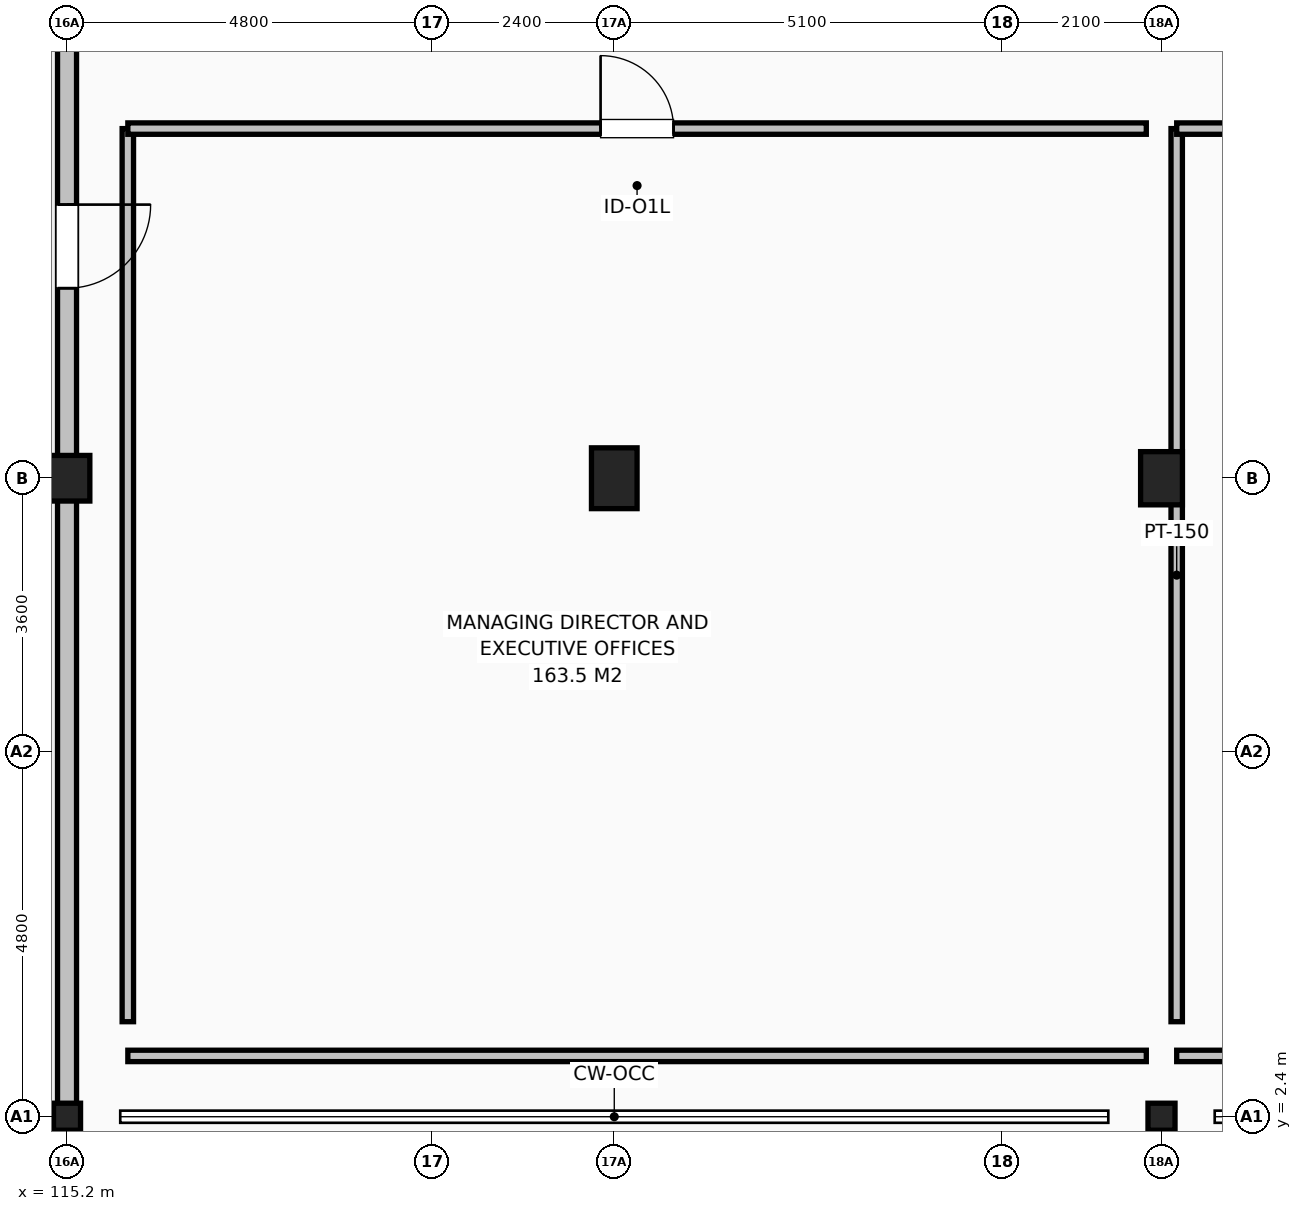
"""IFC4 building model, lengths in metres.
Left out: names, types, materials, properties, quantities, classifications, styles, units other than length and angle.
Written with IfcOpenShell. Run it as: python <this file> out.ifc"""

import sys

from ifc_helpers import new_model, si_unit, direction, frame, frame_2d, origin, origin_2d, place, context, subcontext, project, spatial, rectangle, hollow_circle, extrude, element, fill, save


model = new_model("IFC4")
c1 = context("Model", 3, precision=1e-05, world=origin(), true_north=direction((0.0, 1.0)))
c2 = subcontext(c1, "Body", "Model", "MODEL_VIEW")
j1 = project(units=[si_unit("LENGTHUNIT", "METRE"), si_unit("PLANEANGLEUNIT", "RADIAN")], contexts=[c1])
p1 = place(None, origin())
s1 = spatial("IfcSite", under=j1, at=p1, CompositionType="ELEMENT")
p2 = place(p1, origin())
s2 = spatial("IfcBuilding", under=s1, at=p2, CompositionType="ELEMENT")
p3 = place(p2, frame((0.0, 0.0, 13.2)))
s3 = spatial("IfcBuildingStorey", under=s2, at=p3, CompositionType="ELEMENT", Elevation=13.2)
p4 = place(p3, frame((115.2, 10.8, 0.0), z_axis=(0.0, 0.0, 1.0), x_axis=(1.0, 0.0, 0.0)))
e1 = element("IfcColumn", 1, at=p4, inside=s3, PredefinedType="COLUMN", context=c2, shape_type="SweptSolid", body=[
    extrude(rectangle(XDim=0.6, YDim=0.6, at=origin_2d()), origin(), (0.0, 0.0, 1.0), 4.2),
])
p5 = place(p3, frame((122.4, 10.8, 0.0), z_axis=(0.0, 0.0, 1.0), x_axis=(1.0, 0.0, 0.0)))
e2 = element("IfcColumn", 2, at=p5, inside=s3, PredefinedType="COLUMN", context=c2, shape_type="SweptSolid", body=[
    extrude(rectangle(XDim=0.6, YDim=0.8, at=origin_2d()), origin(), (0.0, 0.0, 1.0), 4.2),
])
p6 = place(p3, frame((129.6, 10.8, 0.0), z_axis=(0.0, 0.0, 1.0), x_axis=(1.0, 0.0, 0.0)))
e3 = element("IfcColumn", 3, at=p6, inside=s3, PredefinedType="COLUMN", context=c2, shape_type="SweptSolid", body=[
    extrude(rectangle(XDim=0.55, YDim=0.7, at=origin_2d()), origin(), (0.0, 0.0, 1.0), 4.2),
])
for number, where, z_axis, x_axis in (
    (4, (115.2, 2.4, 0.0), (0.0, 0.0, 1.0), (1.0, 0.0, 0.0)),
    (5, (129.6, 2.4, 0.0), (0.0, 0.0, 1.0), (1.0, 0.0, 0.0)),
):
    element("IfcColumn", number, at=place(p3, frame(where, z_axis=z_axis, x_axis=x_axis)), inside=s3, PredefinedType="COLUMN", context=c2, shape_type="SweptSolid", body=[
        extrude(hollow_circle(Radius=0.178, WallThickness=0.013, at=origin_2d()), origin(), (0.0, 0.0, 1.0), 4.2),
    ])
p7 = place(p3, frame((115.2, 32.4, 0.0), z_axis=(0.0, 0.0, 1.0), x_axis=(0.0, -1.0, 0.0)))
e6 = element("IfcWall", 6, at=p7, inside=s3, PredefinedType="SOLIDWALL", context=c2, shape_type="SweptSolid", body=[
    extrude(rectangle(XDim=30.0, YDim=0.25, at=frame_2d((15.0, 0.0))), origin(), (0.0, 0.0, 1.0), 3.253),
])
p8 = place(p7, frame((18.0, 0.0, 0.0)))
e7 = element("IfcOpeningElement", 7, at=p8, cuts=e6, PredefinedType="OPENING", context=c2, shape_type="SweptSolid", body=[
    extrude(rectangle(XDim=1.1, YDim=2.15, at=frame_2d((0.55, 1.075))), frame((0.0, 0.135, 0.0), z_axis=(0.0, -1.0, 0.0), x_axis=(1.0, 0.0, 0.0)), (0.0, 0.0, 1.0), 0.27),
])
p9 = place(p3, frame((165.4, 3.2, 0.0), z_axis=(0.0, 0.0, 1.0), x_axis=(-1.0, 0.0, 0.0)))
e8 = element("IfcWall", 8, at=p9, inside=s3, PredefinedType="PARTITIONING", context=c2, shape_type="SweptSolid", body=[
    extrude(rectangle(XDim=35.6, YDim=0.15, at=frame_2d((17.8, 0.0))), origin(), (0.0, 0.0, 1.0), 3.479),
])
p10 = place(p3, frame((129.8, 15.4, 0.0), z_axis=(0.0, 0.0, 1.0), x_axis=(0.0, -1.0, 0.0)))
e9 = element("IfcWall", 9, at=p10, inside=s3, PredefinedType="PARTITIONING", context=c2, shape_type="SweptSolid", body=[
    extrude(rectangle(XDim=11.75, YDim=0.15, at=frame_2d((5.875, 0.0))), origin(), (0.0, 0.0, 1.0), 3.6),
])
p11 = place(p3, frame((129.8, 15.4, 0.0), z_axis=(0.0, 0.0, 1.0), x_axis=(1.0, 0.0, 0.0)))
e10 = element("IfcWall", 10, at=p11, inside=s3, PredefinedType="PARTITIONING", context=c2, shape_type="SweptSolid", body=[
    extrude(rectangle(XDim=35.6, YDim=0.15, at=frame_2d((17.8, 0.0))), origin(), (0.0, 0.0, 1.0), 3.479),
])
p12 = place(p11, frame((16.9, 0.0, 0.0)))
e11 = element("IfcOpeningElement", 11, at=p12, cuts=e10, PredefinedType="OPENING", context=c2, shape_type="SweptSolid", body=[
    extrude(rectangle(XDim=1.8, YDim=2.2, at=frame_2d((0.9, 1.1))), frame((0.0, 0.085, 0.0), z_axis=(0.0, -1.0, 0.0), x_axis=(1.0, 0.0, 0.0)), (0.0, 0.0, 1.0), 0.17),
])
p13 = place(p11, frame((30.6, 0.0, 0.0)))
e12 = element("IfcOpeningElement", 12, at=p13, cuts=e10, PredefinedType="OPENING", context=c2, shape_type="SweptSolid", body=[
    extrude(rectangle(XDim=1.8, YDim=2.2, at=frame_2d((0.9, 1.1))), frame((0.0, 0.085, 0.0), z_axis=(0.0, -1.0, 0.0), x_axis=(1.0, 0.0, 0.0)), (0.0, 0.0, 1.0), 0.17),
])
p14 = place(p3, frame((129.4, 3.2, 0.0), z_axis=(0.0, 0.0, 1.0), x_axis=(-1.0, 0.0, 0.0)))
e13 = element("IfcWall", 13, at=p14, inside=s3, PredefinedType="PARTITIONING", context=c2, shape_type="SweptSolid", body=[
    extrude(rectangle(XDim=13.4, YDim=0.15, at=frame_2d((6.7, 0.0))), origin(), (0.0, 0.0, 1.0), 3.6),
])
p15 = place(p3, frame((116.0, 15.4, 0.0), z_axis=(0.0, 0.0, 1.0), x_axis=(0.0, -1.0, 0.0)))
e14 = element("IfcWall", 14, at=p15, inside=s3, PredefinedType="PARTITIONING", context=c2, shape_type="SweptSolid", body=[
    extrude(rectangle(XDim=11.75, YDim=0.15, at=frame_2d((5.875, 0.0))), origin(), (0.0, 0.0, 1.0), 3.6),
])
p16 = place(p3, frame((116.0, 15.4, 0.0), z_axis=(0.0, 0.0, 1.0), x_axis=(1.0, 0.0, 0.0)))
e15 = element("IfcWall", 15, at=p16, inside=s3, PredefinedType="PARTITIONING", context=c2, shape_type="SweptSolid", body=[
    extrude(rectangle(XDim=13.4, YDim=0.15, at=frame_2d((6.7, 0.0))), origin(), (0.0, 0.0, 1.0), 3.6),
])
p17 = place(p16, frame((6.22, 0.0, 0.0)))
e16 = element("IfcOpeningElement", 16, at=p17, cuts=e15, PredefinedType="OPENING", context=c2, shape_type="SweptSolid", body=[
    extrude(rectangle(XDim=0.96, YDim=2.15, at=frame_2d((0.48, 1.075))), frame((0.0, 0.085, 0.0), z_axis=(0.0, -1.0, 0.0), x_axis=(1.0, 0.0, 0.0)), (0.0, 0.0, 1.0), 0.17),
])
p18 = place(p8, origin())
e17 = element("IfcDoor", 17, at=p18, inside=s3, OperationType="SINGLE_SWING_LEFT", PredefinedType="DOOR", context=c2, shape_type="SweptSolid", body=[
    extrude(rectangle(XDim=1.1, YDim=2.15, at=frame_2d((0.55, 1.075))), frame((0.0, 0.025, 0.0), z_axis=(0.0, -1.0, 0.0), x_axis=(1.0, 0.0, 0.0)), (0.0, 0.0, 1.0), 0.05),
])
fill(e7, e17)
p19 = place(p17, origin())
e18 = element("IfcDoor", 18, at=p19, inside=s3, OperationType="SINGLE_SWING_LEFT", PredefinedType="DOOR", context=c2, shape_type="SweptSolid", body=[
    extrude(rectangle(XDim=0.96, YDim=2.15, at=frame_2d((0.48, 1.075))), frame((0.0, 0.025, 0.0), z_axis=(0.0, -1.0, 0.0), x_axis=(1.0, 0.0, 0.0)), (0.0, 0.0, 1.0), 0.05),
])
fill(e16, e18)
save(model, sys.argv[1])
